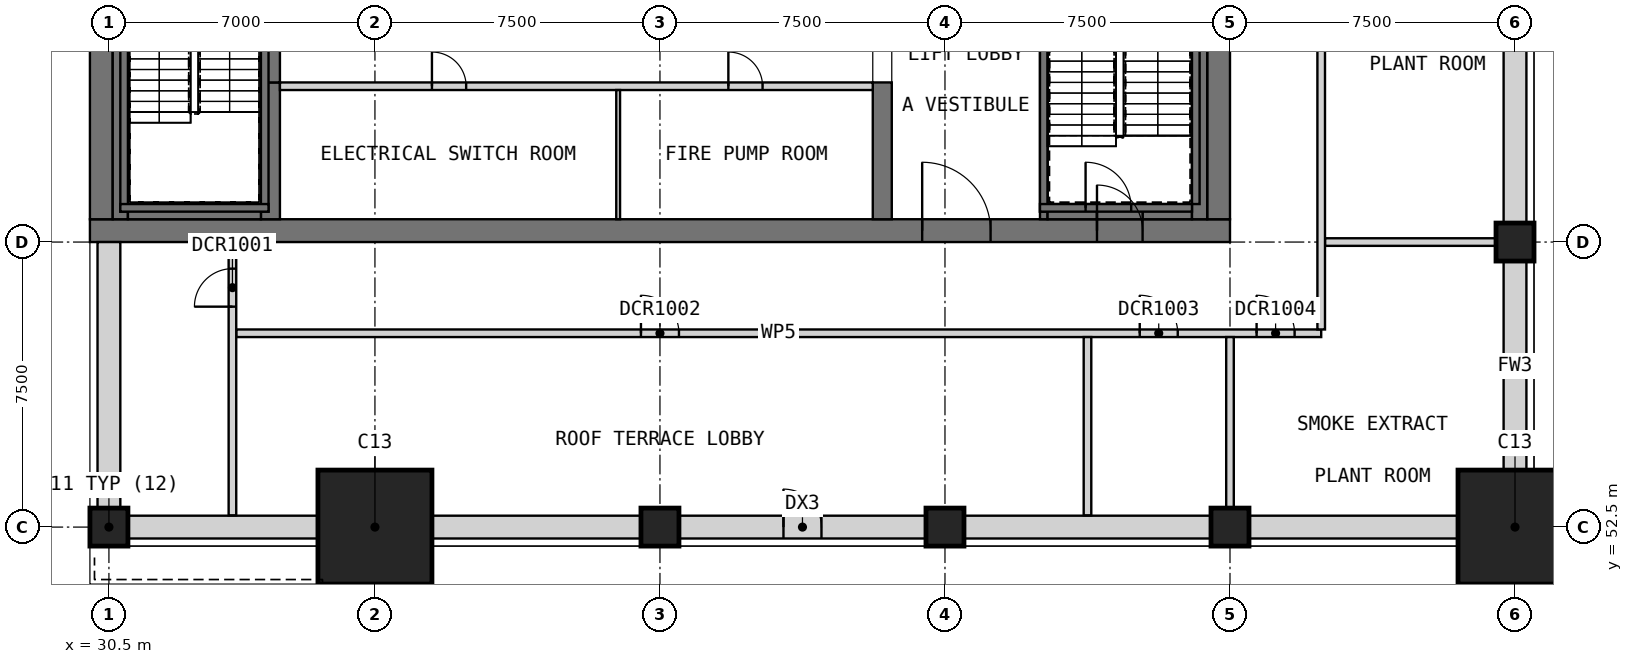
"""IFC4 building model, lengths in metres.
Left out: names, types, materials, properties, quantities, classifications, styles, units other than length and angle.
Written with IfcOpenShell. Run it as: python <this file> out.ifc"""

import sys

from ifc_helpers import new_model, si_unit, direction, frame, frame_2d, origin, origin_2d, place, context, subcontext, project, spatial, rectangle, extrude, element, fill, save


model = new_model("IFC4")
c1 = context("Model", 3, precision=1e-05, world=origin(), true_north=direction((0.0, 1.0)))
c2 = subcontext(c1, "Body", "Model", "MODEL_VIEW")
j1 = project(units=[si_unit("LENGTHUNIT", "METRE"), si_unit("PLANEANGLEUNIT", "RADIAN")], contexts=[c1])
p1 = place(None, origin())
s1 = spatial("IfcSite", under=j1, at=p1, CompositionType="ELEMENT")
p2 = place(p1, origin())
s2 = spatial("IfcBuilding", under=s1, at=p2, CompositionType="ELEMENT")
p3 = place(p2, frame((0.0, 0.0, 320.2)))
s3 = spatial("IfcBuildingStorey", under=s2, at=p3, CompositionType="ELEMENT", Elevation=320.2)
for number, where, z_axis, x_axis in (
    (1, (30.5, 52.5, 0.0), (0.0, 0.0, 1.0), (1.0, 0.0, 0.0)),
    (2, (45.0, 52.5, 0.0), (0.0, 0.0, 1.0), (1.0, 0.0, 0.0)),
    (3, (52.5, 52.5, 0.0), (0.0, 0.0, 1.0), (1.0, 0.0, 0.0)),
    (4, (60.0, 52.5, 0.0), (0.0, 0.0, 1.0), (1.0, 0.0, 0.0)),
    (5, (67.5, 60.0, 0.0), (0.0, 0.0, 1.0), (1.0, 0.0, 0.0)),
):
    element("IfcColumn", number, at=place(p3, frame(where, z_axis=z_axis, x_axis=x_axis)), inside=s3, PredefinedType="COLUMN", context=c2, shape_type="SweptSolid", body=[
        extrude(rectangle(XDim=1.0, YDim=1.0, at=origin_2d()), origin(), (0.0, 0.0, 1.0), 8.0),
    ])
for number, where, z_axis, x_axis in (
    (6, (37.5, 52.5, 0.0), (0.0, 0.0, 1.0), (1.0, 0.0, 0.0)),
    (7, (67.5, 52.5, 0.0), (0.0, 0.0, 1.0), (1.0, 0.0, 0.0)),
):
    element("IfcColumn", number, at=place(p3, frame(where, z_axis=z_axis, x_axis=x_axis)), inside=s3, PredefinedType="COLUMN", context=c2, shape_type="SweptSolid", body=[
        extrude(rectangle(XDim=3.0, YDim=3.0, at=origin_2d()), origin(), (0.0, 0.0, 1.0), 8.0),
    ])
p4 = place(p3, frame((30.0, 60.3, 0.0), z_axis=(0.0, 0.0, 1.0), x_axis=(1.0, 0.0, 0.0)))
e8 = element("IfcWall", 8, at=p4, inside=s3, PredefinedType="SHEAR", context=c2, shape_type="SweptSolid", body=[
    extrude(rectangle(XDim=30.0, YDim=0.6, at=frame_2d((15.0, 0.0))), origin(), (0.0, 0.0, 1.0), 7.7),
])
p5 = place(p4, frame((21.9, 0.0, 0.0)))
e9 = element("IfcOpeningElement", 9, at=p5, cuts=e8, PredefinedType="OPENING", context=c2, shape_type="SweptSolid", body=[
    extrude(rectangle(XDim=1.8, YDim=2.1, at=frame_2d((0.9, 1.05))), frame((0.0, 0.31, 0.0), z_axis=(0.0, -1.0, 0.0), x_axis=(1.0, 0.0, 0.0)), (0.0, 0.0, 1.0), 0.62),
])
p6 = place(p4, frame((26.5, 0.0, 0.0)))
e10 = element("IfcOpeningElement", 10, at=p6, cuts=e8, PredefinedType="OPENING", context=c2, shape_type="SweptSolid", body=[
    extrude(rectangle(XDim=1.2, YDim=2.1, at=frame_2d((0.6, 1.05))), frame((0.0, 0.31, 0.0), z_axis=(0.0, -1.0, 0.0), x_axis=(1.0, 0.0, 0.0)), (0.0, 0.0, 1.0), 0.62),
])
p7 = place(p3, frame((30.3, 60.6, 0.0), z_axis=(0.0, 0.0, 1.0), x_axis=(0.0, 1.0, 0.0)))
e11 = element("IfcWall", 11, at=p7, inside=s3, PredefinedType="SHEAR", context=c2, shape_type="SweptSolid", body=[
    extrude(rectangle(XDim=21.3, YDim=0.6, at=frame_2d((10.65, 0.0))), origin(), (0.0, 0.0, 1.0), 7.7),
])
p8 = place(p3, frame((59.7, 60.6, 0.0), z_axis=(0.0, 0.0, 1.0), x_axis=(0.0, 1.0, 0.0)))
e12 = element("IfcWall", 12, at=p8, inside=s3, PredefinedType="SHEAR", context=c2, shape_type="SweptSolid", body=[
    extrude(rectangle(XDim=21.3, YDim=0.6, at=frame_2d((10.65, 0.0))), origin(), (0.0, 0.0, 1.0), 7.7),
])
p9 = place(p8, frame((14.9, 0.0, 0.0)))
e13 = element("IfcOpeningElement", 13, at=p9, cuts=e12, PredefinedType="OPENING", context=c2, shape_type="SweptSolid", body=[
    extrude(rectangle(XDim=1.8, YDim=2.1, at=frame_2d((0.9, 1.05))), frame((0.0, 0.31, 0.0), z_axis=(0.0, -1.0, 0.0), x_axis=(1.0, 0.0, 0.0)), (0.0, 0.0, 1.0), 0.62),
])
for number, where, z_axis, x_axis in (
    (14, (34.75, 60.6, 0.0), (0.0, 0.0, 1.0), (0.0, 1.0, 0.0)),
    (15, (50.85, 60.6, 0.0), (0.0, 0.0, 1.0), (0.0, 1.0, 0.0)),
):
    element("IfcWall", number, at=place(p3, frame(where, z_axis=z_axis, x_axis=x_axis)), inside=s3, PredefinedType="SHEAR", context=c2, shape_type="SweptSolid", body=[
        extrude(rectangle(XDim=3.6, YDim=0.5, at=frame_2d((1.8, 0.0))), origin(), (0.0, 0.0, 1.0), 7.7),
    ])
p10 = place(p3, frame((31.0, 52.5, 0.0), z_axis=(0.0, 0.0, 1.0), x_axis=(1.0, 0.0, 0.0)))
e16 = element("IfcWall", 16, at=p10, inside=s3, PredefinedType="ELEMENTEDWALL", context=c2, shape_type="SweptSolid", body=[
    extrude(rectangle(XDim=5.0, YDim=0.6, at=frame_2d((2.5, 0.0))), origin(), (0.0, 0.0, 1.0), 6.8),
])
p11 = place(p3, frame((39.0, 52.5, 0.0), z_axis=(0.0, 0.0, 1.0), x_axis=(1.0, 0.0, 0.0)))
e17 = element("IfcWall", 17, at=p11, inside=s3, PredefinedType="ELEMENTEDWALL", context=c2, shape_type="SweptSolid", body=[
    extrude(rectangle(XDim=5.5, YDim=0.6, at=frame_2d((2.75, 0.0))), origin(), (0.0, 0.0, 1.0), 6.8),
])
p12 = place(p3, frame((45.5, 52.5, 0.0), z_axis=(0.0, 0.0, 1.0), x_axis=(1.0, 0.0, 0.0)))
e18 = element("IfcWall", 18, at=p12, inside=s3, PredefinedType="ELEMENTEDWALL", context=c2, shape_type="SweptSolid", body=[
    extrude(rectangle(XDim=6.5, YDim=0.6, at=frame_2d((3.25, 0.0))), origin(), (0.0, 0.0, 1.0), 6.8),
])
p13 = place(p12, frame((2.75, 0.0, 0.0)))
e19 = element("IfcOpeningElement", 19, at=p13, cuts=e18, PredefinedType="OPENING", context=c2, shape_type="SweptSolid", body=[
    extrude(rectangle(XDim=1.0, YDim=2.1, at=frame_2d((0.5, 1.05))), frame((0.0, 0.31, 0.0), z_axis=(0.0, -1.0, 0.0), x_axis=(1.0, 0.0, 0.0)), (0.0, 0.0, 1.0), 0.62),
])
p14 = place(p3, frame((53.0, 52.5, 0.0), z_axis=(0.0, 0.0, 1.0), x_axis=(1.0, 0.0, 0.0)))
e20 = element("IfcWall", 20, at=p14, inside=s3, PredefinedType="ELEMENTEDWALL", context=c2, shape_type="SweptSolid", body=[
    extrude(rectangle(XDim=6.5, YDim=0.6, at=frame_2d((3.25, 0.0))), origin(), (0.0, 0.0, 1.0), 6.8),
])
for number, where, z_axis, x_axis in (
    (21, (60.5, 52.5, 0.0), (0.0, 0.0, 1.0), (1.0, 0.0, 0.0)),
    (22, (67.5, 54.0, 0.0), (0.0, 0.0, 1.0), (0.0, 1.0, 0.0)),
):
    element("IfcWall", number, at=place(p3, frame(where, z_axis=z_axis, x_axis=x_axis)), inside=s3, PredefinedType="ELEMENTEDWALL", context=c2, shape_type="SweptSolid", body=[
        extrude(rectangle(XDim=5.5, YDim=0.6, at=frame_2d((2.75, 0.0))), origin(), (0.0, 0.0, 1.0), 7.7),
    ])
p15 = place(p3, frame((67.5, 60.5, 0.0), z_axis=(0.0, 0.0, 1.0), x_axis=(0.0, 1.0, 0.0)))
e23 = element("IfcWall", 23, at=p15, inside=s3, PredefinedType="ELEMENTEDWALL", context=c2, shape_type="SweptSolid", body=[
    extrude(rectangle(XDim=6.5, YDim=0.6, at=frame_2d((3.25, 0.0))), origin(), (0.0, 0.0, 1.0), 6.8),
])
p16 = place(p3, frame((30.5, 60.0, 0.0), z_axis=(0.0, 0.0, 1.0), x_axis=(0.0, -1.0, 0.0)))
e24 = element("IfcWall", 24, at=p16, inside=s3, PredefinedType="ELEMENTEDWALL", context=c2, shape_type="SweptSolid", body=[
    extrude(rectangle(XDim=7.0, YDim=0.6, at=frame_2d((3.5, 0.0))), origin(), (0.0, 0.0, 1.0), 6.8),
])
p17 = place(p3, frame((35.0, 64.1, 0.0), z_axis=(0.0, 0.0, 1.0), x_axis=(1.0, 0.0, 0.0)))
e25 = element("IfcWall", 25, at=p17, inside=s3, PredefinedType="PARTITIONING", context=c2, shape_type="SweptSolid", body=[
    extrude(rectangle(XDim=15.6, YDim=0.2, at=frame_2d((7.8, 0.0))), origin(), (0.0, 0.0, 1.0), 7.7),
])
p18 = place(p17, frame((4.0, 0.0, 0.0)))
e26 = element("IfcOpeningElement", 26, at=p18, cuts=e25, PredefinedType="OPENING", context=c2, shape_type="SweptSolid", body=[
    extrude(rectangle(XDim=0.9, YDim=2.1, at=frame_2d((0.45, 1.05))), frame((0.0, 0.11, 0.0), z_axis=(0.0, -1.0, 0.0), x_axis=(1.0, 0.0, 0.0)), (0.0, 0.0, 1.0), 0.22),
])
p19 = place(p17, frame((11.8, 0.0, 0.0)))
e27 = element("IfcOpeningElement", 27, at=p19, cuts=e25, PredefinedType="OPENING", context=c2, shape_type="SweptSolid", body=[
    extrude(rectangle(XDim=0.9, YDim=2.1, at=frame_2d((0.45, 1.05))), frame((0.0, 0.11, 0.0), z_axis=(0.0, -1.0, 0.0), x_axis=(1.0, 0.0, 0.0)), (0.0, 0.0, 1.0), 0.22),
])
p20 = place(p3, frame((43.9, 60.6, 0.0), z_axis=(0.0, 0.0, 1.0), x_axis=(0.0, 1.0, 0.0)))
e28 = element("IfcWall", 28, at=p20, inside=s3, PredefinedType="PARTITIONING", context=c2, shape_type="SweptSolid", body=[
    extrude(rectangle(XDim=3.4, YDim=0.1, at=frame_2d((1.7, 0.0))), origin(), (0.0, 0.0, 1.0), 7.7),
])
p21 = place(p3, frame((34.75, 64.2, 0.0), z_axis=(0.0, 0.0, 1.0), x_axis=(0.0, 1.0, 0.0)))
e29 = element("IfcWall", 29, at=p21, inside=s3, PredefinedType="SOLIDWALL", context=c2, shape_type="SweptSolid", body=[
    extrude(rectangle(XDim=3.85, YDim=0.5, at=frame_2d((1.925, 0.0))), origin(), (0.0, 0.0, 1.0), 6.5),
])
p22 = place(p21, frame((2.3, 0.0, 0.0)))
e30 = element("IfcOpeningElement", 30, at=p22, cuts=e29, PredefinedType="OPENING", context=c2, shape_type="SweptSolid", body=[
    extrude(rectangle(XDim=1.2, YDim=2.1, at=frame_2d((0.6, 1.05))), frame((0.0, 0.26, 0.0), z_axis=(0.0, -1.0, 0.0), x_axis=(1.0, 0.0, 0.0)), (0.0, 0.0, 1.0), 0.52),
])
p23 = place(p3, frame((55.1, 60.6, 0.0), z_axis=(0.0, 0.0, 1.0), x_axis=(0.0, 1.0, 0.0)))
e31 = element("IfcWall", 31, at=p23, inside=s3, PredefinedType="SOLIDWALL", context=c2, shape_type="SweptSolid", body=[
    extrude(rectangle(XDim=8.0, YDim=0.2, at=frame_2d((4.0, 0.0))), origin(), (0.0, 0.0, 1.0), 7.7),
])
p24 = place(p3, frame((30.8, 60.6, 0.0), z_axis=(0.0, 0.0, 1.0), x_axis=(0.0, 1.0, 0.0)))
e32 = element("IfcWall", 32, at=p24, inside=s3, PredefinedType="SOLIDWALL", context=c2, shape_type="SweptSolid", body=[
    extrude(rectangle(XDim=21.3, YDim=0.4, at=frame_2d((10.65, 0.0))), origin(), (0.0, 0.0, 1.0), 7.7),
])
p25 = place(p3, frame((31.0, 60.8, 0.0), z_axis=(0.0, 0.0, 1.0), x_axis=(1.0, 0.0, 0.0)))
e33 = element("IfcWall", 33, at=p25, inside=s3, PredefinedType="SOLIDWALL", context=c2, shape_type="SweptSolid", body=[
    extrude(rectangle(XDim=3.5, YDim=0.4, at=frame_2d((1.75, 0.0))), origin(), (0.0, 0.0, 1.0), 7.7),
])
for number, where, z_axis, x_axis in (
    (34, (55.2, 60.8, 0.0), (0.0, 0.0, 1.0), (1.0, 0.0, 0.0)),
    (35, (57.7, 60.8, 0.0), (0.0, 0.0, 1.0), (1.0, 0.0, 0.0)),
):
    element("IfcWall", number, at=place(p3, frame(where, z_axis=z_axis, x_axis=x_axis)), inside=s3, PredefinedType="SOLIDWALL", context=c2, shape_type="SweptSolid", body=[
        extrude(rectangle(XDim=1.3, YDim=0.4, at=frame_2d((0.65, 0.0))), origin(), (0.0, 0.0, 1.0), 7.7),
    ])
p26 = place(p3, frame((59.2, 60.6, 0.0), z_axis=(0.0, 0.0, 1.0), x_axis=(0.0, 1.0, 0.0)))
e36 = element("IfcWall", 36, at=p26, inside=s3, PredefinedType="SOLIDWALL", context=c2, shape_type="SweptSolid", body=[
    extrude(rectangle(XDim=7.9, YDim=0.4, at=frame_2d((3.95, 0.0))), origin(), (0.0, 0.0, 1.0), 7.7),
])
p27 = place(p3, frame((56.5, 60.8, 3.2), z_axis=(0.0, 0.0, 1.0), x_axis=(1.0, 0.0, 0.0)))
e37 = element("IfcWall", 37, at=p27, inside=s3, PredefinedType="SOLIDWALL", context=c2, shape_type="SweptSolid", body=[
    extrude(rectangle(XDim=1.2, YDim=0.4, at=frame_2d((0.6, 0.0))), origin(), (0.0, 0.0, 1.0), 4.5),
])
for number, where, z_axis, x_axis in (
    (38, (30.9, 60.8, 8.0), (0.0, 0.0, 1.0), (0.0, 1.0, 0.0)),
    (39, (34.6, 60.8, 8.0), (0.0, 0.0, 1.0), (0.0, 1.0, 0.0)),
):
    element("IfcWall", number, at=place(p3, frame(where, z_axis=z_axis, x_axis=x_axis)), inside=s3, PredefinedType="SOLIDWALL", context=c2, shape_type="SweptSolid", body=[
        extrude(rectangle(XDim=7.9, YDim=0.2, at=frame_2d((3.95, 0.0))), origin(), (0.0, 0.0, 1.0), 2.7),
    ])
p28 = place(p3, frame((30.8, 60.9, 8.0), z_axis=(0.0, 0.0, 1.0), x_axis=(1.0, 0.0, 0.0)))
e40 = element("IfcWall", 40, at=p28, inside=s3, PredefinedType="SOLIDWALL", context=c2, shape_type="SweptSolid", body=[
    extrude(rectangle(XDim=3.9, YDim=0.2, at=frame_2d((1.95, 0.0))), origin(), (0.0, 0.0, 1.0), 2.7),
])
p29 = place(p3, frame((55.1, 60.8, 8.0), z_axis=(0.0, 0.0, 1.0), x_axis=(0.0, 1.0, 0.0)))
e41 = element("IfcWall", 41, at=p29, inside=s3, PredefinedType="SOLIDWALL", context=c2, shape_type="SweptSolid", body=[
    extrude(rectangle(XDim=7.9, YDim=0.2, at=frame_2d((3.95, 0.0))), origin(), (0.0, 0.0, 1.0), 2.7),
])
p30 = place(p3, frame((59.1, 61.0, 8.0), z_axis=(0.0, 0.0, 1.0), x_axis=(0.0, 1.0, 0.0)))
e42 = element("IfcWall", 42, at=p30, inside=s3, PredefinedType="SOLIDWALL", context=c2, shape_type="SweptSolid", body=[
    extrude(rectangle(XDim=7.7, YDim=0.2, at=frame_2d((3.85, 0.0))), origin(), (0.0, 0.0, 1.0), 2.7),
])
p31 = place(p3, frame((55.0, 60.9, 8.0), z_axis=(0.0, 0.0, 1.0), x_axis=(1.0, 0.0, 0.0)))
e43 = element("IfcWall", 43, at=p31, inside=s3, PredefinedType="SOLIDWALL", context=c2, shape_type="SweptSolid", body=[
    extrude(rectangle(XDim=4.0, YDim=0.2, at=frame_2d((2.0, 0.0))), origin(), (0.0, 0.0, 1.0), 2.7),
])
p32 = place(p31, frame((1.2, 0.0, 0.0)))
e44 = element("IfcOpeningElement", 44, at=p32, cuts=e43, PredefinedType="OPENING", context=c2, shape_type="SweptSolid", body=[
    extrude(rectangle(XDim=1.2, YDim=2.1, at=frame_2d((0.6, 1.05))), frame((0.0, 0.11, 0.0), z_axis=(0.0, -1.0, 0.0), x_axis=(1.0, 0.0, 0.0)), (0.0, 0.0, 1.0), 0.22),
])
p33 = place(p3, frame((33.85, 57.6, 0.0), z_axis=(0.0, 0.0, 1.0), x_axis=(1.0, 0.0, 0.0)))
e45 = element("IfcWall", 45, at=p33, inside=s3, PredefinedType="PARTITIONING", context=c2, shape_type="SweptSolid", body=[
    extrude(rectangle(XDim=28.55, YDim=0.2, at=frame_2d((14.275, 0.0))), origin(), (0.0, 0.0, 1.0), 7.7),
])
p34 = place(p33, frame((10.65, 0.0, 0.0)))
e46 = element("IfcOpeningElement", 46, at=p34, cuts=e45, PredefinedType="OPENING", context=c2, shape_type="SweptSolid", body=[
    extrude(rectangle(XDim=1.0, YDim=2.1, at=frame_2d((0.5, 1.05))), frame((0.0, 0.11, 0.0), z_axis=(0.0, -1.0, 0.0), x_axis=(1.0, 0.0, 0.0)), (0.0, 0.0, 1.0), 0.22),
])
p35 = place(p33, frame((23.775, 0.0, 0.0)))
e47 = element("IfcOpeningElement", 47, at=p35, cuts=e45, PredefinedType="OPENING", context=c2, shape_type="SweptSolid", body=[
    extrude(rectangle(XDim=1.0, YDim=2.1, at=frame_2d((0.5, 1.05))), frame((0.0, 0.11, 0.0), z_axis=(0.0, -1.0, 0.0), x_axis=(1.0, 0.0, 0.0)), (0.0, 0.0, 1.0), 0.22),
])
p36 = place(p33, frame((26.85, 0.0, 0.0)))
e48 = element("IfcOpeningElement", 48, at=p36, cuts=e45, PredefinedType="OPENING", context=c2, shape_type="SweptSolid", body=[
    extrude(rectangle(XDim=1.0, YDim=2.1, at=frame_2d((0.5, 1.05))), frame((0.0, 0.11, 0.0), z_axis=(0.0, -1.0, 0.0), x_axis=(1.0, 0.0, 0.0)), (0.0, 0.0, 1.0), 0.22),
])
p37 = place(p3, frame((62.5, 60.0, 0.0), z_axis=(0.0, 0.0, 1.0), x_axis=(1.0, 0.0, 0.0)))
e49 = element("IfcWall", 49, at=p37, inside=s3, PredefinedType="PARTITIONING", context=c2, shape_type="SweptSolid", body=[
    extrude(rectangle(XDim=5.0, YDim=0.2, at=frame_2d((2.5, 0.0))), origin(), (0.0, 0.0, 1.0), 6.2),
])
p38 = place(p3, frame((33.75, 52.81, 0.0), z_axis=(0.0, 0.0, 1.0), x_axis=(0.0, 1.0, 0.0)))
e50 = element("IfcWall", 50, at=p38, inside=s3, PredefinedType="PARTITIONING", context=c2, shape_type="SweptSolid", body=[
    extrude(rectangle(XDim=7.19, YDim=0.2, at=frame_2d((3.595, 0.0))), origin(), (0.0, 0.0, 1.0), 7.7),
])
p39 = place(p38, frame((5.49, 0.0, 0.0)))
e51 = element("IfcOpeningElement", 51, at=p39, cuts=e50, PredefinedType="OPENING", context=c2, shape_type="SweptSolid", body=[
    extrude(rectangle(XDim=1.0, YDim=2.1, at=frame_2d((0.5, 1.05))), frame((0.0, 0.11, 0.0), z_axis=(0.0, -1.0, 0.0), x_axis=(1.0, 0.0, 0.0)), (0.0, 0.0, 1.0), 0.22),
])
p40 = place(p3, frame((56.25, 52.81, 0.0), z_axis=(0.0, 0.0, 1.0), x_axis=(0.0, 1.0, 0.0)))
e52 = element("IfcWall", 52, at=p40, inside=s3, PredefinedType="PARTITIONING", context=c2, shape_type="SweptSolid", body=[
    extrude(rectangle(XDim=4.69, YDim=0.2, at=frame_2d((2.345, 0.0))), origin(), (0.0, 0.0, 1.0), 7.7),
])
p41 = place(p3, frame((60.0, 52.0, 0.0), z_axis=(0.0, 0.0, 1.0), x_axis=(0.0, 1.0, 0.0)))
e53 = element("IfcWall", 53, at=p41, inside=s3, PredefinedType="PARTITIONING", context=c2, shape_type="SweptSolid", body=[
    extrude(rectangle(XDim=5.5, YDim=0.2, at=frame_2d((2.75, 0.0))), origin(), (0.0, 0.0, 1.0), 6.2),
])
p42 = place(p3, frame((62.4, 57.7, 0.0), z_axis=(0.0, 0.0, 1.0), x_axis=(0.0, 1.0, 0.0)))
e54 = element("IfcWall", 54, at=p42, inside=s3, PredefinedType="PARTITIONING", context=c2, shape_type="SweptSolid", body=[
    extrude(rectangle(XDim=27.1, YDim=0.2, at=frame_2d((13.55, 0.0))), origin(), (0.0, 0.0, 1.0), 7.7),
])
p43 = place(p42, frame((25.5, 0.0, 0.0)))
e55 = element("IfcOpeningElement", 55, at=p43, cuts=e54, PredefinedType="OPENING", context=c2, shape_type="SweptSolid", body=[
    extrude(rectangle(XDim=1.0, YDim=2.1, at=frame_2d((0.5, 1.05))), frame((0.0, 0.11, 0.0), z_axis=(0.0, -1.0, 0.0), x_axis=(1.0, 0.0, 0.0)), (0.0, 0.0, 1.0), 0.22),
])
p44 = place(p42, frame((7.425, 0.0, 0.0)))
e56 = element("IfcOpeningElement", 56, at=p44, cuts=e54, PredefinedType="OPENING", context=c2, shape_type="SweptSolid", body=[
    extrude(rectangle(XDim=1.0, YDim=2.1, at=frame_2d((0.5, 1.05))), frame((0.0, 0.11, 0.0), z_axis=(0.0, -1.0, 0.0), x_axis=(1.0, 0.0, 0.0)), (0.0, 0.0, 1.0), 0.22),
])
p45 = place(p42, frame((16.8, 0.0, 0.0)))
e57 = element("IfcOpeningElement", 57, at=p45, cuts=e54, PredefinedType="OPENING", context=c2, shape_type="SweptSolid", body=[
    extrude(rectangle(XDim=1.0, YDim=2.1, at=frame_2d((0.5, 1.05))), frame((0.0, 0.11, 0.0), z_axis=(0.0, -1.0, 0.0), x_axis=(1.0, 0.0, 0.0)), (0.0, 0.0, 1.0), 0.22),
])
p46 = place(p42, frame((22.425, 0.0, 0.0)))
e58 = element("IfcOpeningElement", 58, at=p46, cuts=e54, PredefinedType="OPENING", context=c2, shape_type="SweptSolid", body=[
    extrude(rectangle(XDim=1.0, YDim=2.1, at=frame_2d((0.5, 1.05))), frame((0.0, 0.11, 0.0), z_axis=(0.0, -1.0, 0.0), x_axis=(1.0, 0.0, 0.0)), (0.0, 0.0, 1.0), 0.22),
])
p47 = place(p13, origin())
e59 = element("IfcDoor", 59, at=p47, inside=s3, OperationType="SINGLE_SWING_LEFT", PredefinedType="DOOR", context=c2, shape_type="SweptSolid", body=[
    extrude(rectangle(XDim=1.0, YDim=2.1, at=frame_2d((0.5, 1.05))), frame((0.0, 0.025, 0.0), z_axis=(0.0, -1.0, 0.0), x_axis=(1.0, 0.0, 0.0)), (0.0, 0.0, 1.0), 0.05),
])
fill(e19, e59)
p48 = place(p18, origin())
e60 = element("IfcDoor", 60, at=p48, inside=s3, OperationType="SINGLE_SWING_RIGHT", PredefinedType="DOOR", context=c2, shape_type="SweptSolid", body=[
    extrude(rectangle(XDim=0.9, YDim=2.1, at=frame_2d((0.45, 1.05))), frame((0.0, 0.025, 0.0), z_axis=(0.0, -1.0, 0.0), x_axis=(1.0, 0.0, 0.0)), (0.0, 0.0, 1.0), 0.05),
])
fill(e26, e60)
p49 = place(p19, origin())
e61 = element("IfcDoor", 61, at=p49, inside=s3, OperationType="SINGLE_SWING_LEFT", PredefinedType="DOOR", context=c2, shape_type="SweptSolid", body=[
    extrude(rectangle(XDim=0.9, YDim=2.1, at=frame_2d((0.45, 1.05))), frame((0.0, 0.025, 0.0), z_axis=(0.0, -1.0, 0.0), x_axis=(1.0, 0.0, 0.0)), (0.0, 0.0, 1.0), 0.05),
])
fill(e27, e61)
p50 = place(p5, origin())
e62 = element("IfcDoor", 62, at=p50, inside=s3, OperationType="DOUBLE_DOOR_SINGLE_SWING", PredefinedType="DOOR", context=c2, shape_type="SweptSolid", body=[
    extrude(rectangle(XDim=1.8, YDim=2.1, at=frame_2d((0.9, 1.05))), frame((0.0, 0.025, 0.0), z_axis=(0.0, -1.0, 0.0), x_axis=(1.0, 0.0, 0.0)), (0.0, 0.0, 1.0), 0.05),
])
fill(e9, e62)
p51 = place(p6, origin())
e63 = element("IfcDoor", 63, at=p51, inside=s3, OperationType="SINGLE_SWING_LEFT", PredefinedType="DOOR", context=c2, shape_type="SweptSolid", body=[
    extrude(rectangle(XDim=1.2, YDim=2.1, at=frame_2d((0.6, 1.05))), frame((0.0, 0.025, 0.0), z_axis=(0.0, -1.0, 0.0), x_axis=(1.0, 0.0, 0.0)), (0.0, 0.0, 1.0), 0.05),
])
fill(e10, e63)
p52 = place(p32, origin())
e64 = element("IfcDoor", 64, at=p52, inside=s3, OperationType="SINGLE_SWING_LEFT", PredefinedType="DOOR", context=c2, shape_type="SweptSolid", body=[
    extrude(rectangle(XDim=1.2, YDim=2.1, at=frame_2d((0.6, 1.05))), frame((0.0, 0.025, 0.0), z_axis=(0.0, -1.0, 0.0), x_axis=(1.0, 0.0, 0.0)), (0.0, 0.0, 1.0), 0.05),
])
fill(e44, e64)
p53 = place(p39, origin())
e65 = element("IfcDoor", 65, at=p53, inside=s3, OperationType="SINGLE_SWING_LEFT", PredefinedType="DOOR", context=c2, shape_type="SweptSolid", body=[
    extrude(rectangle(XDim=1.0, YDim=2.1, at=frame_2d((0.5, 1.05))), frame((0.0, 0.025, 0.0), z_axis=(0.0, -1.0, 0.0), x_axis=(1.0, 0.0, 0.0)), (0.0, 0.0, 1.0), 0.05),
])
fill(e51, e65)
p54 = place(p34, origin())
e66 = element("IfcDoor", 66, at=p54, inside=s3, OperationType="SINGLE_SWING_RIGHT", PredefinedType="DOOR", context=c2, shape_type="SweptSolid", body=[
    extrude(rectangle(XDim=1.0, YDim=2.1, at=frame_2d((0.5, 1.05))), frame((0.0, 0.025, 0.0), z_axis=(0.0, -1.0, 0.0), x_axis=(1.0, 0.0, 0.0)), (0.0, 0.0, 1.0), 0.05),
])
fill(e46, e66)
p55 = place(p35, origin())
e67 = element("IfcDoor", 67, at=p55, inside=s3, OperationType="SINGLE_SWING_RIGHT", PredefinedType="DOOR", context=c2, shape_type="SweptSolid", body=[
    extrude(rectangle(XDim=1.0, YDim=2.1, at=frame_2d((0.5, 1.05))), frame((0.0, 0.025, 0.0), z_axis=(0.0, -1.0, 0.0), x_axis=(1.0, 0.0, 0.0)), (0.0, 0.0, 1.0), 0.05),
])
fill(e47, e67)
p56 = place(p36, origin())
e68 = element("IfcDoor", 68, at=p56, inside=s3, OperationType="SINGLE_SWING_RIGHT", PredefinedType="DOOR", context=c2, shape_type="SweptSolid", body=[
    extrude(rectangle(XDim=1.0, YDim=2.1, at=frame_2d((0.5, 1.05))), frame((0.0, 0.025, 0.0), z_axis=(0.0, -1.0, 0.0), x_axis=(1.0, 0.0, 0.0)), (0.0, 0.0, 1.0), 0.05),
])
fill(e48, e68)
save(model, sys.argv[1])
